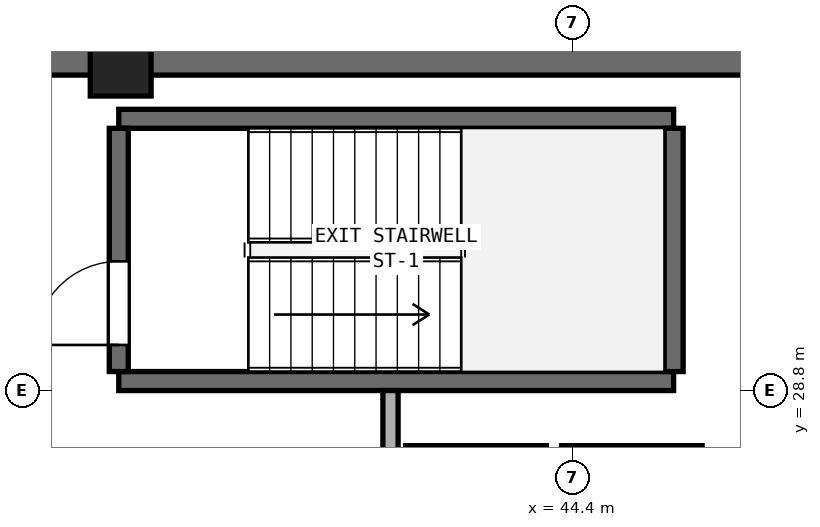
"""IFC4 building model, lengths in metres.
Left out: names, types, materials, properties, quantities, classifications, styles, units other than length and angle.
Written with IfcOpenShell. Run it as: python <this file> out.ifc"""

import sys

from ifc_helpers import new_model, si_unit, direction, frame, frame_2d, origin, origin_2d, place, context, subcontext, project, spatial, rectangle, extrude, element, fill, save


model = new_model("IFC4")
c1 = context("Model", 3, precision=1e-05, world=origin(), true_north=direction((0.0, 1.0)))
c2 = subcontext(c1, "Body", "Model", "MODEL_VIEW")
j1 = project(units=[si_unit("LENGTHUNIT", "METRE"), si_unit("PLANEANGLEUNIT", "RADIAN")], contexts=[c1])
p1 = place(None, origin())
s1 = spatial("IfcSite", under=j1, at=p1, CompositionType="ELEMENT")
p2 = place(p1, origin())
s2 = spatial("IfcBuilding", under=s1, at=p2, CompositionType="ELEMENT")
p3 = place(p2, frame((0.0, 0.0, 304.8)))
s3 = spatial("IfcBuildingStorey", under=s2, at=p3, CompositionType="ELEMENT", Elevation=304.8)
p4 = place(p3, frame((25.4, 33.175, 0.0), z_axis=(0.0, 0.0, 1.0), x_axis=(1.0, 0.0, 0.0)))
e1 = element("IfcWall", 1, at=p4, inside=s3, PredefinedType="SHEAR", context=c2, shape_type="SweptSolid", body=[
    extrude(rectangle(XDim=23.2, YDim=0.45, at=frame_2d((11.6, 0.0))), origin(), (0.0, 0.0, 1.0), 3.4),
])
p5 = place(p3, frame((38.45, 33.075, 0.0), z_axis=(0.0, 0.0, 1.0), x_axis=(1.0, 0.0, 0.0)))
e2 = element("IfcColumn", 2, at=p5, inside=s3, PredefinedType="PILASTER", context=c2, shape_type="SweptSolid", body=[
    extrude(rectangle(XDim=0.8, YDim=0.8, at=origin_2d()), origin(), (0.0, 0.0, 1.0), 3.8),
])
for number, where, z_axis, x_axis in (
    (3, (38.425, 28.925, 0.0), (0.0, 0.0, 1.0), (1.0, 0.0, 0.0)),
    (4, (38.425, 32.375, 0.0), (0.0, 0.0, 1.0), (1.0, 0.0, 0.0)),
):
    element("IfcWall", number, at=place(p3, frame(where, z_axis=z_axis, x_axis=x_axis)), inside=s3, PredefinedType="SHEAR", context=c2, shape_type="SweptSolid", body=[
        extrude(rectangle(XDim=7.3, YDim=0.25, at=frame_2d((3.65, 0.0))), origin(), (0.0, 0.0, 1.0), 3.4),
    ])
p6 = place(p3, frame((38.425, 29.05, 0.0), z_axis=(0.0, 0.0, 1.0), x_axis=(0.0, 1.0, 0.0)))
e5 = element("IfcWall", 5, at=p6, inside=s3, PredefinedType="SHEAR", context=c2, shape_type="SweptSolid", body=[
    extrude(rectangle(XDim=3.2, YDim=0.25, at=frame_2d((1.6, 0.0))), origin(), (0.0, 0.0, 1.0), 3.4),
])
p7 = place(p6, frame((0.35, 0.0, 0.0)))
e6 = element("IfcOpeningElement", 6, at=p7, cuts=e5, PredefinedType="OPENING", context=c2, shape_type="SweptSolid", body=[
    extrude(rectangle(XDim=1.1, YDim=2.15, at=frame_2d((0.55, 1.075))), frame((0.0, 0.135, 0.0), z_axis=(0.0, -1.0, 0.0), x_axis=(1.0, 0.0, 0.0)), (0.0, 0.0, 1.0), 0.27),
])
p8 = place(p3, frame((45.725, 29.05, 0.0), z_axis=(0.0, 0.0, 1.0), x_axis=(0.0, 1.0, 0.0)))
e7 = element("IfcWall", 7, at=p8, inside=s3, PredefinedType="SHEAR", context=c2, shape_type="SweptSolid", body=[
    extrude(rectangle(XDim=3.2, YDim=0.25, at=frame_2d((1.6, 0.0))), origin(), (0.0, 0.0, 1.0), 3.4),
])
for number, where, z_axis, x_axis in (
    (8, (42.2, 27.95, 0.0), (0.0, 0.0, 1.0), (1.0, 0.0, 0.0)),
    (9, (44.25, 27.95, 0.0), (0.0, 0.0, 1.0), (1.0, 0.0, 0.0)),
):
    element("IfcWall", number, at=place(p3, frame(where, z_axis=z_axis, x_axis=x_axis)), inside=s3, PredefinedType="SHEAR", context=c2, shape_type="SweptSolid", body=[
        extrude(rectangle(XDim=1.85, YDim=0.25, at=frame_2d((0.925, 0.0))), origin(), (0.0, 0.0, 1.0), 3.4),
    ])
p9 = place(p3, frame((42.0, 22.75, 0.0), z_axis=(0.0, 0.0, 1.0), x_axis=(0.0, 1.0, 0.0)))
e10 = element("IfcWall", 10, at=p9, inside=s3, PredefinedType="SOLIDWALL", context=c2, shape_type="SweptSolid", body=[
    extrude(rectangle(XDim=6.05, YDim=0.2, at=frame_2d((3.025, 0.0))), origin(), (0.0, 0.0, 1.0), 3.4),
])
p10 = place(p9, frame((0.65, 0.0, 0.0)))
e11 = element("IfcOpeningElement", 11, at=p10, cuts=e10, PredefinedType="OPENING", context=c2, shape_type="SweptSolid", body=[
    extrude(rectangle(XDim=1.2, YDim=2.15, at=frame_2d((0.6, 1.075))), frame((0.0, 0.11, 0.0), z_axis=(0.0, -1.0, 0.0), x_axis=(1.0, 0.0, 0.0)), (0.0, 0.0, 1.0), 0.22),
])
p11 = place(p7, origin())
e12 = element("IfcDoor", 12, at=p11, inside=s3, OperationType="SINGLE_SWING_LEFT", PredefinedType="DOOR", context=c2, shape_type="SweptSolid", body=[
    extrude(rectangle(XDim=1.1, YDim=2.15, at=frame_2d((0.55, 1.075))), frame((0.0, 0.025, 0.0), z_axis=(0.0, -1.0, 0.0), x_axis=(1.0, 0.0, 0.0)), (0.0, 0.0, 1.0), 0.05),
])
fill(e6, e12)
save(model, sys.argv[1])
